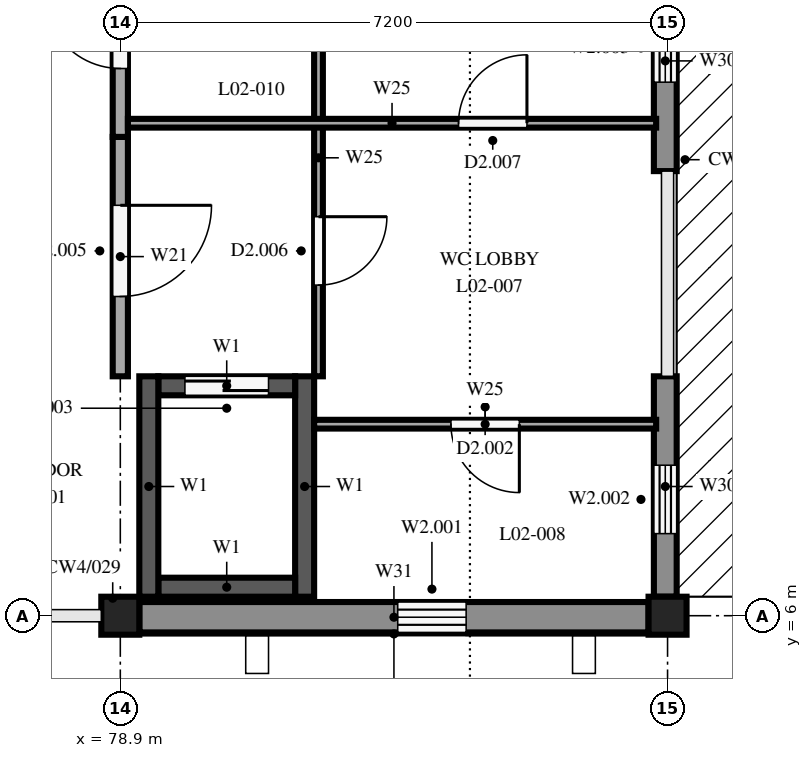
"""IFC4 building model, lengths in metres.
Left out: names, types, materials, properties, quantities, classifications, styles, units other than length and angle.
Written with IfcOpenShell. Run it as: python <this file> out.ifc"""

import sys

from ifc_helpers import new_model, si_unit, direction, frame, frame_2d, origin, origin_2d, place, context, subcontext, project, spatial, rectangle, extrude, element, fill, save


model = new_model("IFC4")
c1 = context("Model", 3, precision=1e-05, world=origin(), true_north=direction((0.0, 1.0)))
c2 = subcontext(c1, "Body", "Model", "MODEL_VIEW")
j1 = project(units=[si_unit("LENGTHUNIT", "METRE"), si_unit("PLANEANGLEUNIT", "RADIAN")], contexts=[c1])
p1 = place(None, origin())
s1 = spatial("IfcSite", under=j1, at=p1, CompositionType="ELEMENT")
p2 = place(p1, origin())
s2 = spatial("IfcBuilding", under=s1, at=p2, CompositionType="ELEMENT")
p3 = place(p2, frame((0.0, 0.0, 8.1)))
s3 = spatial("IfcBuildingStorey", under=s2, at=p3, CompositionType="ELEMENT", Elevation=8.1)
for number, where, z_axis, x_axis in (
    (1, (78.9, 6.0, 0.0), (0.0, 0.0, 1.0), (1.0, 0.0, 0.0)),
    (2, (86.1, 6.0, 0.0), (0.0, 0.0, 1.0), (1.0, 0.0, 0.0)),
):
    element("IfcColumn", number, at=place(p3, frame(where, z_axis=z_axis, x_axis=x_axis)), inside=s3, PredefinedType="COLUMN", context=c2, shape_type="SweptSolid", body=[
        extrude(rectangle(XDim=0.5, YDim=0.5, at=origin_2d()), origin(), (0.0, 0.0, 1.0), 3.35),
    ])
for number, where, z_axis, x_axis in (
    (3, (79.275, 6.25, 0.0), (0.0, 0.0, 1.0), (0.0, 1.0, 0.0)),
    (4, (81.325, 6.25, 0.0), (0.0, 0.0, 1.0), (0.0, 1.0, 0.0)),
):
    element("IfcWall", number, at=place(p3, frame(where, z_axis=z_axis, x_axis=x_axis)), inside=s3, PredefinedType="SHEAR", context=c2, shape_type="SweptSolid", body=[
        extrude(rectangle(XDim=2.9, YDim=0.25, at=frame_2d((1.45, 0.0))), origin(), (0.0, 0.0, 1.0), 3.35),
    ])
p4 = place(p3, frame((79.4, 6.375, 0.0), z_axis=(0.0, 0.0, 1.0), x_axis=(1.0, 0.0, 0.0)))
e5 = element("IfcWall", 5, at=p4, inside=s3, PredefinedType="SHEAR", context=c2, shape_type="SweptSolid", body=[
    extrude(rectangle(XDim=1.8, YDim=0.25, at=frame_2d((0.9, 0.0))), origin(), (0.0, 0.0, 1.0), 3.35),
])
p5 = place(p3, frame((79.4, 9.025, 0.0), z_axis=(0.0, 0.0, 1.0), x_axis=(1.0, 0.0, 0.0)))
e6 = element("IfcWall", 6, at=p5, inside=s3, PredefinedType="SHEAR", context=c2, shape_type="SweptSolid", body=[
    extrude(rectangle(XDim=1.8, YDim=0.25, at=frame_2d((0.9, 0.0))), origin(), (0.0, 0.0, 1.0), 3.35),
])
p6 = place(p5, frame((0.35, 0.0, 0.0)))
e7 = element("IfcOpeningElement", 7, at=p6, cuts=e6, PredefinedType="OPENING", context=c2, shape_type="SweptSolid", body=[
    extrude(rectangle(XDim=1.1, YDim=2.1, at=frame_2d((0.55, 1.05))), frame((0.0, 0.135, 0.0), z_axis=(0.0, -1.0, 0.0), x_axis=(1.0, 0.0, 0.0)), (0.0, 0.0, 1.0), 0.27),
])
p7 = place(p3, frame((86.07, 9.15, 0.0), z_axis=(0.0, 0.0, 1.0), x_axis=(0.0, -1.0, 0.0)))
e8 = element("IfcWall", 8, at=p7, inside=s3, PredefinedType="STANDARD", context=c2, shape_type="SweptSolid", body=[
    extrude(rectangle(XDim=2.9, YDim=0.3, at=frame_2d((1.45, 0.0))), origin(), (0.0, 0.0, 1.0), 2.85),
])
p8 = place(p7, frame((1.17, 0.0, 1.6)))
e9 = element("IfcOpeningElement", 9, at=p8, cuts=e8, PredefinedType="OPENING", context=c2, shape_type="SweptSolid", body=[
    extrude(rectangle(XDim=0.9, YDim=1.0, at=frame_2d((0.45, 0.5))), frame((0.0, 0.16, 0.0), z_axis=(0.0, -1.0, 0.0), x_axis=(1.0, 0.0, 0.0)), (0.0, 0.0, 1.0), 0.32),
])
p9 = place(p3, frame((86.07, 14.75, 0.0), z_axis=(0.0, 0.0, 1.0), x_axis=(0.0, -1.0, 0.0)))
e10 = element("IfcWall", 10, at=p9, inside=s3, PredefinedType="STANDARD", context=c2, shape_type="SweptSolid", body=[
    extrude(rectangle(XDim=2.9, YDim=0.3, at=frame_2d((1.45, 0.0))), origin(), (0.0, 0.0, 1.0), 2.85),
])
p10 = place(p9, frame((0.83, 0.0, 1.6)))
e11 = element("IfcOpeningElement", 11, at=p10, cuts=e10, PredefinedType="OPENING", context=c2, shape_type="SweptSolid", body=[
    extrude(rectangle(XDim=0.9, YDim=1.0, at=frame_2d((0.45, 0.5))), frame((0.0, 0.16, 0.0), z_axis=(0.0, -1.0, 0.0), x_axis=(1.0, 0.0, 0.0)), (0.0, 0.0, 1.0), 0.32),
])
p11 = place(p3, frame((85.85, 5.98, 0.0), z_axis=(0.0, 0.0, 1.0), x_axis=(-1.0, 0.0, 0.0)))
e12 = element("IfcWall", 12, at=p11, inside=s3, PredefinedType="STANDARD", context=c2, shape_type="SweptSolid", body=[
    extrude(rectangle(XDim=6.7, YDim=0.4, at=frame_2d((3.35, 0.0))), origin(), (0.0, 0.0, 1.0), 2.9),
])
p12 = place(p11, frame((2.4, 0.0, 1.6)))
e13 = element("IfcOpeningElement", 13, at=p12, cuts=e12, PredefinedType="OPENING", context=c2, shape_type="SweptSolid", body=[
    extrude(rectangle(XDim=0.9, YDim=1.0, at=frame_2d((0.45, 0.5))), frame((0.0, 0.21, 0.0), z_axis=(0.0, -1.0, 0.0), x_axis=(1.0, 0.0, 0.0)), (0.0, 0.0, 1.0), 0.42),
])
p13 = place(p3, frame((78.9, 12.3, 0.0), z_axis=(0.0, 0.0, 1.0), x_axis=(0.0, -1.0, 0.0)))
e14 = element("IfcWall", 14, at=p13, inside=s3, PredefinedType="PARTITIONING", context=c2, shape_type="SweptSolid", body=[
    extrude(rectangle(XDim=3.15, YDim=0.2, at=frame_2d((1.575, 0.0))), origin(), (0.0, 0.0, 1.0), 2.9),
])
p14 = place(p13, frame((0.9, 0.0, 0.0)))
e15 = element("IfcOpeningElement", 15, at=p14, cuts=e14, PredefinedType="OPENING", context=c2, shape_type="SweptSolid", body=[
    extrude(rectangle(XDim=1.2, YDim=2.1, at=frame_2d((0.6, 1.05))), frame((0.0, 0.11, 0.0), z_axis=(0.0, -1.0, 0.0), x_axis=(1.0, 0.0, 0.0)), (0.0, 0.0, 1.0), 0.22),
])
p15 = place(p3, frame((78.9, 12.3, 0.0), z_axis=(0.0, 0.0, 1.0), x_axis=(0.0, 1.0, 0.0)))
e16 = element("IfcWall", 16, at=p15, inside=s3, PredefinedType="PARTITIONING", context=c2, shape_type="SweptSolid", body=[
    extrude(rectangle(XDim=2.45, YDim=0.2, at=frame_2d((1.225, 0.0))), origin(), (0.0, 0.0, 1.0), 2.9),
])
p16 = place(p15, frame((0.9, 0.0, 0.0)))
e17 = element("IfcOpeningElement", 17, at=p16, cuts=e16, PredefinedType="OPENING", context=c2, shape_type="SweptSolid", body=[
    extrude(rectangle(XDim=1.0, YDim=2.1, at=frame_2d((0.5, 1.05))), frame((0.0, 0.11, 0.0), z_axis=(0.0, -1.0, 0.0), x_axis=(1.0, 0.0, 0.0)), (0.0, 0.0, 1.0), 0.22),
])
p17 = place(p3, frame((81.508, 14.9, 0.0), z_axis=(0.0, 0.0, 1.0), x_axis=(0.0, -1.0, 0.0)))
e18 = element("IfcWall", 18, at=p17, inside=s3, PredefinedType="PARTITIONING", context=c2, shape_type="SweptSolid", body=[
    extrude(rectangle(XDim=5.75, YDim=0.115, at=frame_2d((2.875, 0.0))), origin(), (0.0, 0.0, 1.0), 3.35),
])
p18 = place(p17, frame((3.65, 0.0, 0.0)))
e19 = element("IfcOpeningElement", 19, at=p18, cuts=e18, PredefinedType="OPENING", context=c2, shape_type="SweptSolid", body=[
    extrude(rectangle(XDim=0.9, YDim=2.1, at=frame_2d((0.45, 1.05))), frame((0.0, 0.067, 0.0), z_axis=(0.0, -1.0, 0.0), x_axis=(1.0, 0.0, 0.0)), (0.0, 0.0, 1.0), 0.135),
])
p19 = place(p3, frame((85.95, 8.52, 0.0), z_axis=(0.0, 0.0, 1.0), x_axis=(-1.0, 0.0, 0.0)))
e20 = element("IfcWall", 20, at=p19, inside=s3, PredefinedType="PARTITIONING", context=c2, shape_type="SweptSolid", body=[
    extrude(rectangle(XDim=4.5, YDim=0.115, at=frame_2d((2.25, 0.0))), origin(), (0.0, 0.0, 1.0), 3.35),
])
p20 = place(p19, frame((1.8, 0.0, 0.0)))
e21 = element("IfcOpeningElement", 21, at=p20, cuts=e20, PredefinedType="OPENING", context=c2, shape_type="SweptSolid", body=[
    extrude(rectangle(XDim=0.9, YDim=2.1, at=frame_2d((0.45, 1.05))), frame((0.0, 0.067, 0.0), z_axis=(0.0, -1.0, 0.0), x_axis=(1.0, 0.0, 0.0)), (0.0, 0.0, 1.0), 0.135),
])
p21 = place(p3, frame((79.0, 12.48, 0.0), z_axis=(0.0, 0.0, 1.0), x_axis=(1.0, 0.0, 0.0)))
e22 = element("IfcWall", 22, at=p21, inside=s3, PredefinedType="PARTITIONING", context=c2, shape_type="SweptSolid", body=[
    extrude(rectangle(XDim=6.95, YDim=0.115, at=frame_2d((3.475, 0.0))), origin(), (0.0, 0.0, 1.0), 3.35),
])
p22 = place(p21, frame((4.35, 0.0, 0.0)))
e23 = element("IfcOpeningElement", 23, at=p22, cuts=e22, PredefinedType="OPENING", context=c2, shape_type="SweptSolid", body=[
    extrude(rectangle(XDim=0.9, YDim=2.1, at=frame_2d((0.45, 1.05))), frame((0.0, 0.067, 0.0), z_axis=(0.0, -1.0, 0.0), x_axis=(1.0, 0.0, 0.0)), (0.0, 0.0, 1.0), 0.135),
])
p23 = place(p8, origin())
e24 = element("IfcWindow", 24, at=p23, inside=s3, PartitioningType="SINGLE_PANEL", PredefinedType="WINDOW", context=c2, shape_type="SweptSolid", body=[
    extrude(rectangle(XDim=0.9, YDim=1.0, at=frame_2d((0.45, 0.5))), frame((0.0, 0.03, 0.0), z_axis=(0.0, -1.0, 0.0), x_axis=(1.0, 0.0, 0.0)), (0.0, 0.0, 1.0), 0.06),
])
fill(e9, e24)
p24 = place(p10, origin())
e25 = element("IfcWindow", 25, at=p24, inside=s3, PartitioningType="SINGLE_PANEL", PredefinedType="WINDOW", context=c2, shape_type="SweptSolid", body=[
    extrude(rectangle(XDim=0.9, YDim=1.0, at=frame_2d((0.45, 0.5))), frame((0.0, 0.03, 0.0), z_axis=(0.0, -1.0, 0.0), x_axis=(1.0, 0.0, 0.0)), (0.0, 0.0, 1.0), 0.06),
])
fill(e11, e25)
p25 = place(p12, origin())
e26 = element("IfcWindow", 26, at=p25, inside=s3, PartitioningType="SINGLE_PANEL", PredefinedType="WINDOW", context=c2, shape_type="SweptSolid", body=[
    extrude(rectangle(XDim=0.9, YDim=1.0, at=frame_2d((0.45, 0.5))), frame((0.0, 0.03, 0.0), z_axis=(0.0, -1.0, 0.0), x_axis=(1.0, 0.0, 0.0)), (0.0, 0.0, 1.0), 0.06),
])
fill(e13, e26)
p26 = place(p14, origin())
e27 = element("IfcDoor", 27, at=p26, inside=s3, OperationType="SINGLE_SWING_LEFT", PredefinedType="DOOR", context=c2, shape_type="SweptSolid", body=[
    extrude(rectangle(XDim=1.2, YDim=2.1, at=frame_2d((0.6, 1.05))), frame((0.0, 0.025, 0.0), z_axis=(0.0, -1.0, 0.0), x_axis=(1.0, 0.0, 0.0)), (0.0, 0.0, 1.0), 0.05),
])
fill(e15, e27)
p27 = place(p16, origin())
e28 = element("IfcDoor", 28, at=p27, inside=s3, OperationType="SINGLE_SWING_RIGHT", PredefinedType="DOOR", context=c2, shape_type="SweptSolid", body=[
    extrude(rectangle(XDim=1.0, YDim=2.1, at=frame_2d((0.5, 1.05))), frame((0.0, 0.025, 0.0), z_axis=(0.0, -1.0, 0.0), x_axis=(1.0, 0.0, 0.0)), (0.0, 0.0, 1.0), 0.05),
])
fill(e17, e28)
p28 = place(p18, origin())
e29 = element("IfcDoor", 29, at=p28, inside=s3, OperationType="SINGLE_SWING_LEFT", PredefinedType="DOOR", context=c2, shape_type="SweptSolid", body=[
    extrude(rectangle(XDim=0.9, YDim=2.1, at=frame_2d((0.45, 1.05))), frame((0.0, 0.025, 0.0), z_axis=(0.0, -1.0, 0.0), x_axis=(1.0, 0.0, 0.0)), (0.0, 0.0, 1.0), 0.05),
])
fill(e19, e29)
p29 = place(p20, origin())
e30 = element("IfcDoor", 30, at=p29, inside=s3, OperationType="SINGLE_SWING_LEFT", PredefinedType="DOOR", context=c2, shape_type="SweptSolid", body=[
    extrude(rectangle(XDim=0.9, YDim=2.1, at=frame_2d((0.45, 1.05))), frame((0.0, 0.025, 0.0), z_axis=(0.0, -1.0, 0.0), x_axis=(1.0, 0.0, 0.0)), (0.0, 0.0, 1.0), 0.05),
])
fill(e21, e30)
p30 = place(p22, origin())
e31 = element("IfcDoor", 31, at=p30, inside=s3, OperationType="SINGLE_SWING_RIGHT", PredefinedType="DOOR", context=c2, shape_type="SweptSolid", body=[
    extrude(rectangle(XDim=0.9, YDim=2.1, at=frame_2d((0.45, 1.05))), frame((0.0, 0.025, 0.0), z_axis=(0.0, -1.0, 0.0), x_axis=(1.0, 0.0, 0.0)), (0.0, 0.0, 1.0), 0.05),
])
fill(e23, e31)
p31 = place(p6, origin())
e32 = element("IfcDoor", 32, at=p31, inside=s3, OperationType="SLIDING_TO_LEFT", PredefinedType="DOOR", context=c2, shape_type="SweptSolid", body=[
    extrude(rectangle(XDim=1.1, YDim=2.1, at=frame_2d((0.55, 1.05))), frame((0.0, 0.025, 0.0), z_axis=(0.0, -1.0, 0.0), x_axis=(1.0, 0.0, 0.0)), (0.0, 0.0, 1.0), 0.05),
])
fill(e7, e32)
save(model, sys.argv[1])
